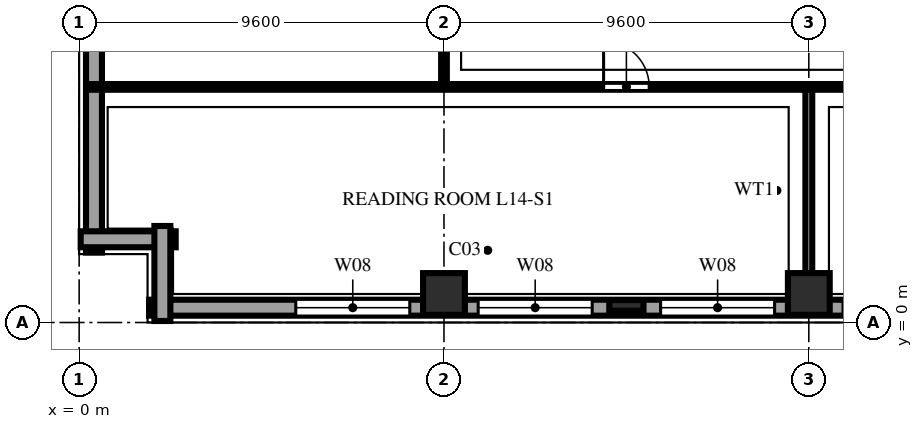
"""IFC4 building model, lengths in metres.
Left out: names, types, materials, properties, quantities, classifications, styles, units other than length and angle.
Written with IfcOpenShell. Run it as: python <this file> out.ifc"""

import sys

from ifc_helpers import new_model, si_unit, direction, frame, frame_2d, origin, origin_2d, place, context, subcontext, project, spatial, rectangle, extrude, element, fill, save


model = new_model("IFC4")
c1 = context("Model", 3, precision=1e-05, world=origin(), true_north=direction((0.0, 1.0)))
c2 = subcontext(c1, "Body", "Model", "MODEL_VIEW")
j1 = project(units=[si_unit("LENGTHUNIT", "METRE"), si_unit("PLANEANGLEUNIT", "RADIAN")], contexts=[c1])
p1 = place(None, origin())
s1 = spatial("IfcSite", under=j1, at=p1, CompositionType="ELEMENT")
p2 = place(p1, origin())
s2 = spatial("IfcBuilding", under=s1, at=p2, CompositionType="ELEMENT")
p3 = place(p2, frame((0.0, 0.0, 58.4)))
s3 = spatial("IfcBuildingStorey", under=s2, at=p3, CompositionType="ELEMENT", Elevation=58.4)
for number, where, z_axis, x_axis in (
    (1, (9.6, 0.75, 0.0), (0.0, 0.0, 1.0), (1.0, 0.0, 0.0)),
    (2, (19.2, 0.75, 0.0), (0.0, 0.0, 1.0), (1.0, 0.0, 0.0)),
):
    element("IfcColumn", number, at=place(p3, frame(where, z_axis=z_axis, x_axis=x_axis)), inside=s3, PredefinedType="COLUMN", context=c2, shape_type="SweptSolid", body=[
        extrude(rectangle(XDim=1.1, YDim=1.1, at=origin_2d()), origin(), (0.0, 0.0, 1.0), 3.8),
    ])
p4 = place(p3, frame((14.4, 0.45, 0.0), z_axis=(0.0, 0.0, 1.0), x_axis=(1.0, 0.0, 0.0)))
e3 = element("IfcColumn", 3, at=p4, inside=s3, PredefinedType="PILASTER", context=c2, shape_type="SweptSolid", body=[
    extrude(rectangle(XDim=0.9, YDim=0.28, at=origin_2d()), origin(), (0.0, 0.0, 1.0), 3.8),
])
p5 = place(p3, frame((1.84, 0.39, 0.0), z_axis=(0.0, 0.0, 1.0), x_axis=(1.0, 0.0, 0.0)))
e4 = element("IfcWall", 4, at=p5, inside=s3, PredefinedType="SOLIDWALL", context=c2, shape_type="SweptSolid", body=[
    extrude(rectangle(XDim=63.52, YDim=0.42, at=frame_2d((31.76, 0.0))), origin(), (0.0, 0.0, 1.0), 3.54),
])
p6 = place(p5, frame((3.86, 0.0, 0.75)))
e5 = element("IfcOpeningElement", 5, at=p6, cuts=e4, PredefinedType="OPENING", context=c2, shape_type="SweptSolid", body=[
    extrude(rectangle(XDim=3.0, YDim=1.9, at=frame_2d((1.5, 0.95))), frame((0.0, 0.222, 0.0), z_axis=(0.0, -1.0, 0.0), x_axis=(1.0, 0.0, 0.0)), (0.0, 0.0, 1.0), 0.444),
])
p7 = place(p5, frame((8.66, 0.0, 0.75)))
e6 = element("IfcOpeningElement", 6, at=p7, cuts=e4, PredefinedType="OPENING", context=c2, shape_type="SweptSolid", body=[
    extrude(rectangle(XDim=3.0, YDim=1.9, at=frame_2d((1.5, 0.95))), frame((0.0, 0.222, 0.0), z_axis=(0.0, -1.0, 0.0), x_axis=(1.0, 0.0, 0.0)), (0.0, 0.0, 1.0), 0.444),
])
p8 = place(p5, frame((13.46, 0.0, 0.75)))
e7 = element("IfcOpeningElement", 7, at=p8, cuts=e4, PredefinedType="OPENING", context=c2, shape_type="SweptSolid", body=[
    extrude(rectangle(XDim=3.0, YDim=1.9, at=frame_2d((1.5, 0.95))), frame((0.0, 0.222, 0.0), z_axis=(0.0, -1.0, 0.0), x_axis=(1.0, 0.0, 0.0)), (0.0, 0.0, 1.0), 0.444),
])
p9 = place(p5, frame((18.26, 0.0, 0.75)))
e8 = element("IfcOpeningElement", 8, at=p9, cuts=e4, PredefinedType="OPENING", context=c2, shape_type="SweptSolid", body=[
    extrude(rectangle(XDim=3.0, YDim=1.9, at=frame_2d((1.5, 0.95))), frame((0.0, 0.222, 0.0), z_axis=(0.0, -1.0, 0.0), x_axis=(1.0, 0.0, 0.0)), (0.0, 0.0, 1.0), 0.444),
])
p10 = place(p5, frame((23.06, 0.0, 0.75)))
e9 = element("IfcOpeningElement", 9, at=p10, cuts=e4, PredefinedType="OPENING", context=c2, shape_type="SweptSolid", body=[
    extrude(rectangle(XDim=3.0, YDim=1.9, at=frame_2d((1.5, 0.95))), frame((0.0, 0.222, 0.0), z_axis=(0.0, -1.0, 0.0), x_axis=(1.0, 0.0, 0.0)), (0.0, 0.0, 1.0), 0.444),
])
p11 = place(p3, frame((0.39, 65.36, 0.0), z_axis=(0.0, 0.0, 1.0), x_axis=(0.0, -1.0, 0.0)))
e10 = element("IfcWall", 10, at=p11, inside=s3, PredefinedType="SOLIDWALL", context=c2, shape_type="SweptSolid", body=[
    extrude(rectangle(XDim=63.52, YDim=0.42, at=frame_2d((31.76, 0.0))), origin(), (0.0, 0.0, 1.0), 3.54),
])
p12 = place(p11, frame((4.885, 0.0, 0.9)))
e11 = element("IfcOpeningElement", 11, at=p12, cuts=e10, PredefinedType="OPENING", context=c2, shape_type="SweptSolid", body=[
    extrude(rectangle(XDim=0.95, YDim=1.85, at=frame_2d((0.475, 0.925))), frame((0.0, 0.222, 0.0), z_axis=(0.0, -1.0, 0.0), x_axis=(1.0, 0.0, 0.0)), (0.0, 0.0, 1.0), 0.444),
])
p13 = place(p11, frame((9.41, 0.0, 0.9)))
e12 = element("IfcOpeningElement", 12, at=p13, cuts=e10, PredefinedType="OPENING", context=c2, shape_type="SweptSolid", body=[
    extrude(rectangle(XDim=1.5, YDim=1.85, at=frame_2d((0.75, 0.925))), frame((0.0, 0.222, 0.0), z_axis=(0.0, -1.0, 0.0), x_axis=(1.0, 0.0, 0.0)), (0.0, 0.0, 1.0), 0.444),
])
p14 = place(p11, frame((14.485, 0.0, 0.9)))
e13 = element("IfcOpeningElement", 13, at=p14, cuts=e10, PredefinedType="OPENING", context=c2, shape_type="SweptSolid", body=[
    extrude(rectangle(XDim=0.95, YDim=1.85, at=frame_2d((0.475, 0.925))), frame((0.0, 0.222, 0.0), z_axis=(0.0, -1.0, 0.0), x_axis=(1.0, 0.0, 0.0)), (0.0, 0.0, 1.0), 0.444),
])
p15 = place(p11, frame((19.01, 0.0, 0.9)))
e14 = element("IfcOpeningElement", 14, at=p15, cuts=e10, PredefinedType="OPENING", context=c2, shape_type="SweptSolid", body=[
    extrude(rectangle(XDim=1.5, YDim=1.85, at=frame_2d((0.75, 0.925))), frame((0.0, 0.222, 0.0), z_axis=(0.0, -1.0, 0.0), x_axis=(1.0, 0.0, 0.0)), (0.0, 0.0, 1.0), 0.444),
])
p16 = place(p11, frame((24.085, 0.0, 0.9)))
e15 = element("IfcOpeningElement", 15, at=p16, cuts=e10, PredefinedType="OPENING", context=c2, shape_type="SweptSolid", body=[
    extrude(rectangle(XDim=0.95, YDim=1.85, at=frame_2d((0.475, 0.925))), frame((0.0, 0.222, 0.0), z_axis=(0.0, -1.0, 0.0), x_axis=(1.0, 0.0, 0.0)), (0.0, 0.0, 1.0), 0.444),
])
p17 = place(p11, frame((28.61, 0.0, 0.9)))
e16 = element("IfcOpeningElement", 16, at=p17, cuts=e10, PredefinedType="OPENING", context=c2, shape_type="SweptSolid", body=[
    extrude(rectangle(XDim=1.5, YDim=1.85, at=frame_2d((0.75, 0.925))), frame((0.0, 0.222, 0.0), z_axis=(0.0, -1.0, 0.0), x_axis=(1.0, 0.0, 0.0)), (0.0, 0.0, 1.0), 0.444),
])
p18 = place(p11, frame((33.685, 0.0, 0.9)))
e17 = element("IfcOpeningElement", 17, at=p18, cuts=e10, PredefinedType="OPENING", context=c2, shape_type="SweptSolid", body=[
    extrude(rectangle(XDim=0.95, YDim=1.85, at=frame_2d((0.475, 0.925))), frame((0.0, 0.222, 0.0), z_axis=(0.0, -1.0, 0.0), x_axis=(1.0, 0.0, 0.0)), (0.0, 0.0, 1.0), 0.444),
])
p19 = place(p11, frame((38.21, 0.0, 0.9)))
e18 = element("IfcOpeningElement", 18, at=p19, cuts=e10, PredefinedType="OPENING", context=c2, shape_type="SweptSolid", body=[
    extrude(rectangle(XDim=1.5, YDim=1.85, at=frame_2d((0.75, 0.925))), frame((0.0, 0.222, 0.0), z_axis=(0.0, -1.0, 0.0), x_axis=(1.0, 0.0, 0.0)), (0.0, 0.0, 1.0), 0.444),
])
p20 = place(p11, frame((43.285, 0.0, 0.9)))
e19 = element("IfcOpeningElement", 19, at=p20, cuts=e10, PredefinedType="OPENING", context=c2, shape_type="SweptSolid", body=[
    extrude(rectangle(XDim=0.95, YDim=1.85, at=frame_2d((0.475, 0.925))), frame((0.0, 0.222, 0.0), z_axis=(0.0, -1.0, 0.0), x_axis=(1.0, 0.0, 0.0)), (0.0, 0.0, 1.0), 0.444),
])
p21 = place(p11, frame((47.81, 0.0, 0.9)))
e20 = element("IfcOpeningElement", 20, at=p21, cuts=e10, PredefinedType="OPENING", context=c2, shape_type="SweptSolid", body=[
    extrude(rectangle(XDim=1.5, YDim=1.85, at=frame_2d((0.75, 0.925))), frame((0.0, 0.222, 0.0), z_axis=(0.0, -1.0, 0.0), x_axis=(1.0, 0.0, 0.0)), (0.0, 0.0, 1.0), 0.444),
])
p22 = place(p11, frame((52.885, 0.0, 0.9)))
e21 = element("IfcOpeningElement", 21, at=p22, cuts=e10, PredefinedType="OPENING", context=c2, shape_type="SweptSolid", body=[
    extrude(rectangle(XDim=0.95, YDim=1.85, at=frame_2d((0.475, 0.925))), frame((0.0, 0.222, 0.0), z_axis=(0.0, -1.0, 0.0), x_axis=(1.0, 0.0, 0.0)), (0.0, 0.0, 1.0), 0.444),
])
for number, where, z_axis, x_axis in (
    (22, (0.04, 2.19, 0.0), (0.0, 0.0, 1.0), (1.0, 0.0, 0.0)),
    (23, (2.19, 2.54, 0.0), (0.0, 0.0, 1.0), (0.0, -1.0, 0.0)),
):
    element("IfcWall", number, at=place(p3, frame(where, z_axis=z_axis, x_axis=x_axis)), inside=s3, PredefinedType="SOLIDWALL", context=c2, shape_type="SweptSolid", body=[
        extrude(rectangle(XDim=2.5, YDim=0.42, at=frame_2d((1.25, 0.0))), origin(), (0.0, 0.0, 1.0), 3.54),
    ])
p23 = place(p3, frame((9.6, 6.2, 0.0), z_axis=(0.0, 0.0, 1.0), x_axis=(0.0, 1.0, 0.0)))
e24 = element("IfcWall", 24, at=p23, inside=s3, PredefinedType="PARTITIONING", context=c2, shape_type="SweptSolid", body=[
    extrude(rectangle(XDim=3.4, YDim=0.15, at=frame_2d((1.7, 0.0))), origin(), (0.0, 0.0, 1.0), 2.845),
])
p24 = place(p3, frame((19.2, 0.22, 0.0), z_axis=(0.0, 0.0, 1.0), x_axis=(0.0, 1.0, 0.0)))
e25 = element("IfcWall", 25, at=p24, inside=s3, PredefinedType="PARTITIONING", context=c2, shape_type="SweptSolid", body=[
    extrude(rectangle(XDim=0.53, YDim=0.18, at=frame_2d((0.265, 0.0))), origin(), (0.0, 0.0, 1.0), 3.54),
])
p25 = place(p3, frame((19.2, 0.75, 0.0), z_axis=(0.0, 0.0, 1.0), x_axis=(0.0, 1.0, 0.0)))
e26 = element("IfcWall", 26, at=p25, inside=s3, PredefinedType="PARTITIONING", context=c2, shape_type="SweptSolid", body=[
    extrude(rectangle(XDim=5.45, YDim=0.18, at=frame_2d((2.725, 0.0))), origin(), (0.0, 0.0, 1.0), 2.845),
])
p26 = place(p3, frame((0.22, 6.2, 0.0), z_axis=(0.0, 0.0, 1.0), x_axis=(1.0, 0.0, 0.0)))
e27 = element("IfcWall", 27, at=p26, inside=s3, PredefinedType="PARTITIONING", context=c2, shape_type="SweptSolid", body=[
    extrude(rectangle(XDim=52.58, YDim=0.15, at=frame_2d((26.29, 0.0))), origin(), (0.0, 0.0, 1.0), 3.54),
])
p27 = place(p26, frame((13.58, 0.0, 0.0)))
e28 = element("IfcOpeningElement", 28, at=p27, cuts=e27, PredefinedType="OPENING", context=c2, shape_type="SweptSolid", body=[
    extrude(rectangle(XDim=1.2, YDim=2.2, at=frame_2d((0.6, 1.1))), frame((0.0, 0.087, 0.0), z_axis=(0.0, -1.0, 0.0), x_axis=(1.0, 0.0, 0.0)), (0.0, 0.0, 1.0), 0.174),
])
p28 = place(p26, frame((23.28, 0.0, 0.0)))
e29 = element("IfcOpeningElement", 29, at=p28, cuts=e27, PredefinedType="OPENING", context=c2, shape_type="SweptSolid", body=[
    extrude(rectangle(XDim=1.2, YDim=2.2, at=frame_2d((0.6, 1.1))), frame((0.0, 0.087, 0.0), z_axis=(0.0, -1.0, 0.0), x_axis=(1.0, 0.0, 0.0)), (0.0, 0.0, 1.0), 0.174),
])
p29 = place(p26, frame((41.18, 0.0, 0.0)))
e30 = element("IfcOpeningElement", 30, at=p29, cuts=e27, PredefinedType="OPENING", context=c2, shape_type="SweptSolid", body=[
    extrude(rectangle(XDim=2.0, YDim=2.3, at=frame_2d((1.0, 1.15))), frame((0.0, 0.087, 0.0), z_axis=(0.0, -1.0, 0.0), x_axis=(1.0, 0.0, 0.0)), (0.0, 0.0, 1.0), 0.174),
])
p30 = place(p6, origin())
e31 = element("IfcWindow", 31, at=p30, inside=s3, PartitioningType="TRIPLE_PANEL_VERTICAL", PredefinedType="WINDOW", context=c2, shape_type="SweptSolid", body=[
    extrude(rectangle(XDim=3.0, YDim=1.9, at=frame_2d((1.5, 0.95))), frame((0.0, 0.11, 0.0), z_axis=(0.0, -1.0, 0.0), x_axis=(1.0, 0.0, 0.0)), (0.0, 0.0, 1.0), 0.06),
])
fill(e5, e31)
p31 = place(p7, origin())
e32 = element("IfcWindow", 32, at=p31, inside=s3, PartitioningType="TRIPLE_PANEL_VERTICAL", PredefinedType="WINDOW", context=c2, shape_type="SweptSolid", body=[
    extrude(rectangle(XDim=3.0, YDim=1.9, at=frame_2d((1.5, 0.95))), frame((0.0, 0.11, 0.0), z_axis=(0.0, -1.0, 0.0), x_axis=(1.0, 0.0, 0.0)), (0.0, 0.0, 1.0), 0.06),
])
fill(e6, e32)
p32 = place(p8, origin())
e33 = element("IfcWindow", 33, at=p32, inside=s3, PartitioningType="TRIPLE_PANEL_VERTICAL", PredefinedType="WINDOW", context=c2, shape_type="SweptSolid", body=[
    extrude(rectangle(XDim=3.0, YDim=1.9, at=frame_2d((1.5, 0.95))), frame((0.0, 0.11, 0.0), z_axis=(0.0, -1.0, 0.0), x_axis=(1.0, 0.0, 0.0)), (0.0, 0.0, 1.0), 0.06),
])
fill(e7, e33)
p33 = place(p9, origin())
e34 = element("IfcWindow", 34, at=p33, inside=s3, PartitioningType="TRIPLE_PANEL_VERTICAL", PredefinedType="WINDOW", context=c2, shape_type="SweptSolid", body=[
    extrude(rectangle(XDim=3.0, YDim=1.9, at=frame_2d((1.5, 0.95))), frame((0.0, 0.11, 0.0), z_axis=(0.0, -1.0, 0.0), x_axis=(1.0, 0.0, 0.0)), (0.0, 0.0, 1.0), 0.06),
])
fill(e8, e34)
p34 = place(p27, origin())
e35 = element("IfcDoor", 35, at=p34, inside=s3, OperationType="SINGLE_SWING_LEFT", PredefinedType="DOOR", context=c2, shape_type="SweptSolid", body=[
    extrude(rectangle(XDim=1.2, YDim=2.2, at=frame_2d((0.6, 1.1))), frame((0.0, 0.025, 0.0), z_axis=(0.0, -1.0, 0.0), x_axis=(1.0, 0.0, 0.0)), (0.0, 0.0, 1.0), 0.05),
])
fill(e28, e35)
save(model, sys.argv[1])
